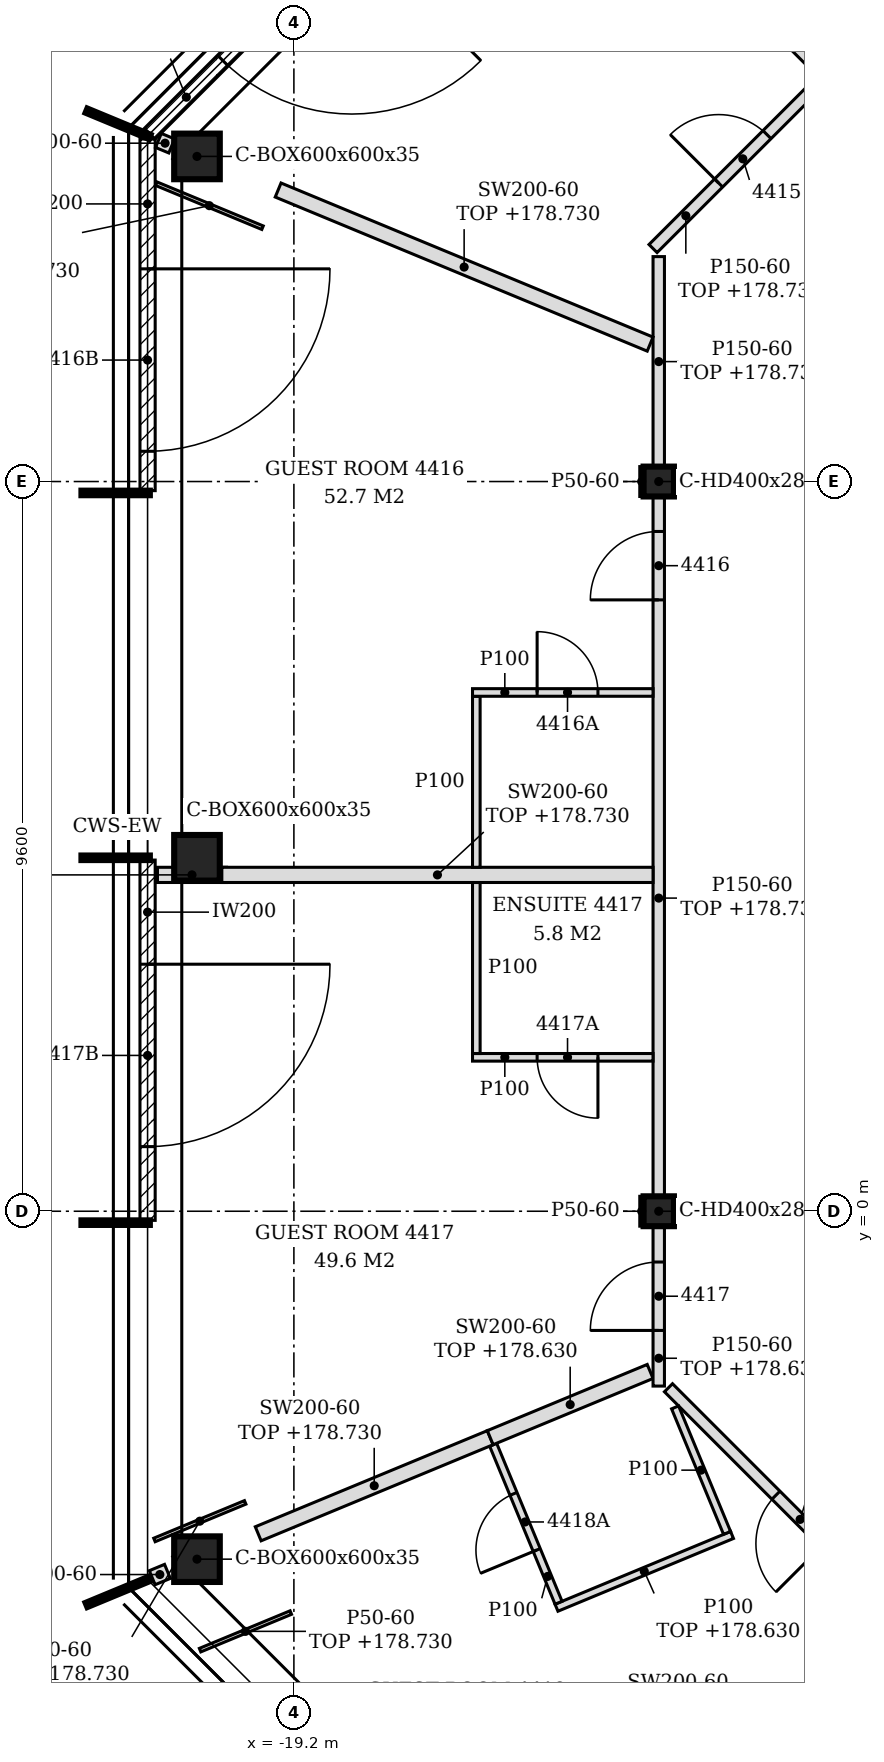
"""IFC4 building model, lengths in metres.
Left out: names, types, materials, properties, quantities, classifications, styles, units other than length and angle.
Written with IfcOpenShell. Run it as: python <this file> out.ifc"""

import sys

from ifc_helpers import new_model, si_unit, direction, frame, frame_2d, origin, origin_2d, place, context, subcontext, project, spatial, polyline, rectangle, hollow_rectangle, i_section, outline, extrude, clip, halfspace, element, fill, save


model = new_model("IFC4")
c1 = context("Model", 3, precision=1e-05, world=origin(), true_north=direction((0.0, 1.0)))
c2 = subcontext(c1, "Body", "Model", "MODEL_VIEW")
j1 = project(units=[si_unit("LENGTHUNIT", "METRE"), si_unit("PLANEANGLEUNIT", "RADIAN")], contexts=[c1])
p1 = place(None, origin())
s1 = spatial("IfcSite", under=j1, at=p1, CompositionType="ELEMENT")
p2 = place(p1, origin())
s2 = spatial("IfcBuilding", under=s1, at=p2, CompositionType="ELEMENT")
p3 = place(p2, frame((0.0, 0.0, 175.8)))
s3 = spatial("IfcBuildingStorey", under=s2, at=p3, CompositionType="ELEMENT", Elevation=175.8)
for number, where, z_axis, x_axis in (
    (1, (-20.475, 13.877, -0.15), (0.183, -0.122, 0.976), (0.555, 0.832, 0.0)),
    (2, (-20.475, 4.65, -0.15), (0.183, -0.122, 0.976), (0.555, 0.832, 0.0)),
    (3, (-20.475, -4.577, -0.15), (0.183, -0.122, 0.976), (0.555, 0.832, 0.0)),
):
    element("IfcColumn", number, at=place(p3, frame(where, z_axis=z_axis, x_axis=x_axis)), inside=s3, PredefinedType="COLUMN", context=c2, shape_type="Clipping", body=[
        clip(clip(extrude(hollow_rectangle(XDim=0.6, YDim=0.6, WallThickness=0.035, at=origin_2d()), origin(), (0.0, 0.0, 1.0), 3.69), halfspace(frame((0.0, 0.0, 0.022), z_axis=(0.0, 0.0, 1.0), x_axis=(1.0, 0.0, 0.0)), True)), halfspace(frame((0.0, 0.0, 3.67), z_axis=(0.0, 0.0, 1.0), x_axis=(1.0, 0.0, 0.0)), False)),
    ])
for number, where, z_axis, x_axis in (
    (4, (-14.4, 0.0, -0.15), (0.0, 0.0, 1.0), (1.0, 0.0, 0.0)),
    (5, (-14.4, 9.6, -0.15), (0.0, 0.0, 1.0), (1.0, 0.0, 0.0)),
):
    element("IfcColumn", number, at=place(p3, frame(where, z_axis=z_axis, x_axis=x_axis)), inside=s3, PredefinedType="COLUMN", context=c2, shape_type="SweptSolid", body=[
        extrude(i_section(OverallWidth=0.399, OverallDepth=0.393, WebThickness=0.023, FlangeThickness=0.037, FilletRadius=0.015, at=origin_2d()), origin(), (0.0, 0.0, 1.0), 3.6),
    ])
p4 = place(p3, frame((-18.295, 16.976, 0.0), z_axis=(0.0, 0.0, 1.0), x_axis=(-0.707137595296, -0.707075965734, 0.0)))
e6 = element("IfcWall", 6, at=p4, inside=s3, PredefinedType="NOTDEFINED", context=c2, shape_type="SweptSolid", body=[
    extrude(rectangle(XDim=3.961, YDim=0.2, at=frame_2d((1.981, 0.0))), origin(), (0.0, 0.0, 1.0), 3.45),
])
p5 = place(p4, frame((0.2, 0.0, 0.0)))
e7 = element("IfcOpeningElement", 7, at=p5, cuts=e6, PredefinedType="OPENING", context=c2, shape_type="SweptSolid", body=[
    extrude(rectangle(XDim=2.4, YDim=2.4, at=frame_2d((1.2, 1.2))), frame((0.0, 0.11, 0.0), z_axis=(0.0, -1.0, 0.0), x_axis=(1.0, 0.0, 0.0)), (0.0, 0.0, 1.0), 0.22),
])
p6 = place(p3, frame((-21.125, 14.106, 0.0), z_axis=(0.0, 0.0, 1.0), x_axis=(0.0, -1.0, 0.0)))
e8 = element("IfcWall", 8, at=p6, inside=s3, PredefinedType="NOTDEFINED", context=c2, shape_type="SweptSolid", body=[
    extrude(rectangle(XDim=4.626, YDim=0.2, at=frame_2d((2.313, 0.0))), origin(), (0.0, 0.0, 1.0), 3.45),
])
p7 = place(p6, frame((1.708, 0.0, 0.0)))
e9 = element("IfcOpeningElement", 9, at=p7, cuts=e8, PredefinedType="OPENING", context=c2, shape_type="SweptSolid", body=[
    extrude(rectangle(XDim=2.4, YDim=2.4, at=frame_2d((1.2, 1.2))), frame((0.0, 0.11, 0.0), z_axis=(0.0, -1.0, 0.0), x_axis=(1.0, 0.0, 0.0)), (0.0, 0.0, 1.0), 0.22),
])
p8 = place(p3, frame((-21.125, 4.62, 0.0), z_axis=(0.0, 0.0, 1.0), x_axis=(0.0, -1.0, 0.0)))
e10 = element("IfcWall", 10, at=p8, inside=s3, PredefinedType="NOTDEFINED", context=c2, shape_type="SweptSolid", body=[
    extrude(rectangle(XDim=4.74, YDim=0.2, at=frame_2d((2.37, 0.0))), origin(), (0.0, 0.0, 1.0), 3.45),
])
p9 = place(p8, frame((1.37, 0.0, 0.0)))
e11 = element("IfcOpeningElement", 11, at=p9, cuts=e10, PredefinedType="OPENING", context=c2, shape_type="SweptSolid", body=[
    extrude(rectangle(XDim=2.4, YDim=2.4, at=frame_2d((1.2, 1.2))), frame((0.0, 0.11, 0.0), z_axis=(0.0, -1.0, 0.0), x_axis=(1.0, 0.0, 0.0)), (0.0, 0.0, 1.0), 0.22),
])
p10 = place(p3, frame((-15.206, -9.119, 0.0), z_axis=(0.0, 0.0, 1.0), x_axis=(0.70719733142, 0.707016219356, 0.0)))
e12 = element("IfcWall", 12, at=p10, inside=s3, PredefinedType="PARTITIONING", context=c2, shape_type="SweptSolid", body=[
    extrude(rectangle(XDim=5.392, YDim=0.2, at=frame_2d((2.696, 0.0))), origin(), (0.0, 0.0, 1.0), 2.83),
])
p11 = place(p3, frame((-8.322, -8.272, 0.0), z_axis=(0.0, 0.0, 1.0), x_axis=(-0.707106781187, 0.707106781187, 0.0)))
e13 = element("IfcWall", 13, at=p11, inside=s3, PredefinedType="PARTITIONING", context=c2, shape_type="SweptSolid", body=[
    extrude(rectangle(XDim=8.415, YDim=0.15, at=frame_2d((4.207, 0.0))), origin(), (0.0, 0.0, 1.0), 2.83),
])
p12 = place(p11, frame((5.515, 0.0, 0.0)))
e14 = element("IfcOpeningElement", 14, at=p12, cuts=e13, PredefinedType="OPENING", context=c2, shape_type="SweptSolid", body=[
    extrude(rectangle(XDim=0.9, YDim=2.1, at=frame_2d((0.45, 1.05))), frame((0.0, 0.085, 0.0), z_axis=(0.0, -1.0, 0.0), x_axis=(1.0, 0.0, 0.0)), (0.0, 0.0, 1.0), 0.17),
])
p13 = place(p11, frame((1.594, 0.0, 0.0)))
e15 = element("IfcOpeningElement", 15, at=p13, cuts=e13, PredefinedType="OPENING", context=c2, shape_type="SweptSolid", body=[
    extrude(rectangle(XDim=0.9, YDim=2.1, at=frame_2d((0.45, 1.05))), frame((0.0, 0.085, 0.0), z_axis=(0.0, -1.0, 0.0), x_axis=(1.0, 0.0, 0.0)), (0.0, 0.0, 1.0), 0.17),
])
p14 = place(p3, frame((-15.745, -5.216, 0.0), z_axis=(0.0, 0.0, 1.0), x_axis=(0.923777505624, 0.38292965425, 0.0)))
e16 = element("IfcWall", 16, at=p14, inside=s3, PredefinedType="PARTITIONING", context=c2, shape_type="SweptSolid", body=[
    extrude(rectangle(XDim=2.5, YDim=0.1, at=frame_2d((1.25, 0.0))), origin(), (0.0, 0.0, 1.0), 2.83),
])
p15 = place(p3, frame((-15.718, -5.151, 0.0), z_axis=(0.0, 0.0, 1.0), x_axis=(-0.382380536126, 0.924004938078, 0.0)))
e17 = element("IfcWall", 17, at=p15, inside=s3, PredefinedType="PARTITIONING", context=c2, shape_type="SweptSolid", body=[
    extrude(rectangle(XDim=2.251, YDim=0.1, at=frame_2d((1.125, 0.0))), origin(), (0.0, 0.0, 1.0), 3.45),
])
p16 = place(p15, frame((0.75, 0.0, 0.0)))
e18 = element("IfcOpeningElement", 18, at=p16, cuts=e17, PredefinedType="OPENING", context=c2, shape_type="SweptSolid", body=[
    extrude(rectangle(XDim=0.8, YDim=2.1, at=frame_2d((0.4, 1.05))), frame((0.0, 0.06, 0.0), z_axis=(0.0, -1.0, 0.0), x_axis=(1.0, 0.0, 0.0)), (0.0, 0.0, 1.0), 0.12),
])
p17 = place(p3, frame((-21.064, -4.821, 0.0), z_axis=(0.0, 0.0, 1.0), x_axis=(0.923674221268, 0.383178721962, 0.0)))
e19 = element("IfcWall", 19, at=p17, inside=s3, PredefinedType="PARTITIONING", context=c2, shape_type="SweptSolid", body=[
    extrude(rectangle(XDim=0.217, YDim=0.2, at=frame_2d((0.109, 0.0))), origin(), (0.0, 0.0, 1.0), 3.45),
])
p18 = place(p3, frame((-19.67, -4.243, 0.0), z_axis=(0.0, 0.0, 1.0), x_axis=(0.923888058455, 0.382662848268, 0.0)))
e20 = element("IfcWall", 20, at=p18, inside=s3, PredefinedType="PARTITIONING", context=c2, shape_type="SweptSolid", body=[
    extrude(rectangle(XDim=3.304, YDim=0.2, at=frame_2d((1.652, 0.0))), origin(), (0.0, 0.0, 1.0), 2.93),
])
p19 = place(p3, frame((-13.501, -4.232, 0.0), z_axis=(0.0, 0.0, 1.0), x_axis=(-0.382528764213, 0.923943582991, 0.0)))
e21 = element("IfcWall", 21, at=p19, inside=s3, PredefinedType="PARTITIONING", context=c2, shape_type="SweptSolid", body=[
    extrude(rectangle(XDim=1.787, YDim=0.1, at=frame_2d((0.894, 0.0))), origin(), (0.0, 0.0, 1.0), 3.45),
])
p20 = place(p3, frame((-16.617, -2.979, 0.0), z_axis=(0.0, 0.0, 1.0), x_axis=(0.923927982336, 0.382566443191, 0.0)))
e22 = element("IfcWall", 22, at=p20, inside=s3, PredefinedType="PARTITIONING", context=c2, shape_type="SweptSolid", body=[
    extrude(rectangle(XDim=2.277, YDim=0.2, at=frame_2d((1.138, 0.0))), origin(), (0.0, 0.0, 1.0), 2.83),
])
p21 = place(p3, frame((-14.4, -2.3, 0.0), z_axis=(0.0, 0.0, 1.0), x_axis=(0.0, 1.0, 0.0)))
e23 = element("IfcWall", 23, at=p21, inside=s3, PredefinedType="PARTITIONING", context=c2, shape_type="SweptSolid", body=[
    extrude(rectangle(XDim=2.104, YDim=0.15, at=frame_2d((1.052, 0.0))), origin(), (0.0, 0.0, 1.0), 2.83),
])
p22 = place(p21, frame((0.732, 0.0, 0.0)))
e24 = element("IfcOpeningElement", 24, at=p22, cuts=e23, PredefinedType="OPENING", context=c2, shape_type="SweptSolid", body=[
    extrude(rectangle(XDim=0.9, YDim=2.1, at=frame_2d((0.45, 1.05))), frame((0.0, 0.085, 0.0), z_axis=(0.0, -1.0, 0.0), x_axis=(1.0, 0.0, 0.0)), (0.0, 0.0, 1.0), 0.17),
])
p23 = place(p3, frame((-14.4, 0.197, 0.0), z_axis=(0.0, 0.0, 1.0), x_axis=(0.0, 1.0, 0.0)))
e25 = element("IfcWall", 25, at=p23, inside=s3, PredefinedType="PARTITIONING", context=c2, shape_type="SweptSolid", body=[
    extrude(rectangle(XDim=9.207, YDim=0.15, at=frame_2d((4.604, 0.0))), origin(), (0.0, 0.0, 1.0), 2.93),
])
p24 = place(p23, frame((7.846, 0.0, 0.0)))
e26 = element("IfcOpeningElement", 26, at=p24, cuts=e25, PredefinedType="OPENING", context=c2, shape_type="SweptSolid", body=[
    extrude(rectangle(XDim=0.9, YDim=2.1, at=frame_2d((0.45, 1.05))), frame((0.0, 0.085, 0.0), z_axis=(0.0, -1.0, 0.0), x_axis=(1.0, 0.0, 0.0)), (0.0, 0.0, 1.0), 0.17),
])
p25 = place(p3, frame((-16.85, 2.025, 0.0), z_axis=(0.0, 0.0, 1.0), x_axis=(1.0, 0.0, 0.0)))
e27 = element("IfcWall", 27, at=p25, inside=s3, PredefinedType="PARTITIONING", context=c2, shape_type="SweptSolid", body=[
    extrude(outline(polyline([(0.0, 0.0), (2.375, 0.0), (2.375, 2.93), (2.3, 2.93), (2.298, 3.45), (0.0, 3.45), (0.0, 0.0)])), frame((0.0, 0.05, 0.0), z_axis=(0.0, -1.0, 0.0), x_axis=(1.0, 0.0, 0.0)), (0.0, 0.0, 1.0), 0.1),
])
p26 = place(p25, frame((0.85, 0.0, 0.0)))
e28 = element("IfcOpeningElement", 28, at=p26, cuts=e27, PredefinedType="OPENING", context=c2, shape_type="SweptSolid", body=[
    extrude(rectangle(XDim=0.8, YDim=2.1, at=frame_2d((0.4, 1.05))), frame((0.0, 0.06, 0.0), z_axis=(0.0, -1.0, 0.0), x_axis=(1.0, 0.0, 0.0)), (0.0, 0.0, 1.0), 0.12),
])
p27 = place(p3, frame((-16.8, 2.075, 0.0), z_axis=(0.0, 0.0, 1.0), x_axis=(0.0, 1.0, 0.0)))
e29 = element("IfcWall", 29, at=p27, inside=s3, PredefinedType="PARTITIONING", context=c2, shape_type="SweptSolid", body=[
    extrude(outline(polyline([(0.0, 0.0), (2.25, 0.0), (2.25, 3.45), (2.21, 3.45), (2.208, 3.07), (2.04, 3.07), (2.038, 3.45), (0.0, 3.45), (0.0, 0.0)])), frame((0.0, 0.05, 0.0), z_axis=(0.0, -1.0, 0.0), x_axis=(1.0, 0.0, 0.0)), (0.0, 0.0, 1.0), 0.1),
])
p28 = place(p3, frame((-20.995, 4.425, 0.0), z_axis=(0.0, 0.0, 1.0), x_axis=(1.0, 0.0, 0.0)))
e30 = element("IfcWall", 30, at=p28, inside=s3, PredefinedType="PARTITIONING", context=c2, shape_type="SweptSolid", body=[
    extrude(outline(polyline([(0.0, 0.0), (0.167, 0.0), (0.288, 0.863), (0.449, 1.725), (0.675, 2.587), (0.909, 3.45), (0.0, 3.45), (0.0, 2.587), (0.0, 1.725), (0.0, 0.863), (0.0, 0.0)])), frame((0.0, 0.1, 0.0), z_axis=(0.0, -1.0, 0.0), x_axis=(1.0, 0.0, 0.0)), (0.0, 0.0, 1.0), 0.2),
])
p29 = place(p3, frame((-20.148, 4.425, 0.0), z_axis=(0.0, 0.0, 1.0), x_axis=(1.0, 0.0, 0.0)))
e31 = element("IfcWall", 31, at=p29, inside=s3, PredefinedType="PARTITIONING", context=c2, shape_type="SweptSolid", body=[
    extrude(outline(polyline([(0.0, 0.0), (5.673, 0.0), (5.673, 0.863), (5.673, 1.725), (5.673, 2.587), (5.673, 2.93), (0.646, 2.93), (0.609, 2.587), (0.447, 1.725), (0.234, 0.863), (0.0, 0.0)])), frame((0.0, 0.1, 0.0), z_axis=(0.0, -1.0, 0.0), x_axis=(1.0, 0.0, 0.0)), (0.0, 0.0, 1.0), 0.2),
])
p30 = place(p3, frame((-16.8, 4.525, 0.0), z_axis=(0.0, 0.0, 1.0), x_axis=(0.0, 1.0, 0.0)))
e32 = element("IfcWall", 32, at=p30, inside=s3, PredefinedType="PARTITIONING", context=c2, shape_type="SweptSolid", body=[
    extrude(rectangle(XDim=2.25, YDim=0.1, at=frame_2d((1.125, 0.0))), origin(), (0.0, 0.0, 1.0), 3.45),
])
p31 = place(p3, frame((-16.85, 6.825, 0.0), z_axis=(0.0, 0.0, 1.0), x_axis=(1.0, 0.0, 0.0)))
e33 = element("IfcWall", 33, at=p31, inside=s3, PredefinedType="PARTITIONING", context=c2, shape_type="SweptSolid", body=[
    extrude(outline(polyline([(0.0, 0.0), (2.375, 0.0), (2.375, 2.93), (2.3, 2.93), (2.298, 3.45), (0.0, 3.45), (0.0, 0.0)])), frame((0.0, 0.05, 0.0), z_axis=(0.0, -1.0, 0.0), x_axis=(1.0, 0.0, 0.0)), (0.0, 0.0, 1.0), 0.1),
])
p32 = place(p31, frame((0.85, 0.0, 0.0)))
e34 = element("IfcOpeningElement", 34, at=p32, cuts=e33, PredefinedType="OPENING", context=c2, shape_type="SweptSolid", body=[
    extrude(rectangle(XDim=0.8, YDim=2.1, at=frame_2d((0.4, 1.05))), frame((0.0, 0.06, 0.0), z_axis=(0.0, -1.0, 0.0), x_axis=(1.0, 0.0, 0.0)), (0.0, 0.0, 1.0), 0.12),
])
p33 = place(p3, frame((-14.4, 9.796, 0.0), z_axis=(0.0, 0.0, 1.0), x_axis=(0.0, 1.0, 0.0)))
e35 = element("IfcWall", 35, at=p33, inside=s3, PredefinedType="PARTITIONING", context=c2, shape_type="SweptSolid", body=[
    extrude(rectangle(XDim=2.763, YDim=0.15, at=frame_2d((1.381, 0.0))), origin(), (0.0, 0.0, 1.0), 2.93),
])
p34 = place(p3, frame((-14.513, 11.408, 0.0), z_axis=(0.0, 0.0, 1.0), x_axis=(-0.923884829347, 0.382670644421, 0.0)))
e36 = element("IfcWall", 36, at=p34, inside=s3, PredefinedType="PARTITIONING", context=c2, shape_type="SweptSolid", body=[
    extrude(rectangle(XDim=5.297, YDim=0.2, at=frame_2d((2.649, 0.0))), origin(), (0.0, 0.0, 1.0), 2.93),
])
p35 = place(p3, frame((-14.475, 12.665, 0.0), z_axis=(0.0, 0.0, 1.0), x_axis=(0.70726258305, 0.706950944987, 0.0)))
e37 = element("IfcWall", 37, at=p35, inside=s3, PredefinedType="PARTITIONING", context=c2, shape_type="SweptSolid", body=[
    extrude(rectangle(XDim=3.134, YDim=0.15, at=frame_2d((1.567, 0.0))), origin(), (0.0, 0.0, 1.0), 2.93),
])
p36 = place(p35, frame((1.22, 0.0, 0.0)))
e38 = element("IfcOpeningElement", 38, at=p36, cuts=e37, PredefinedType="OPENING", context=c2, shape_type="SweptSolid", body=[
    extrude(rectangle(XDim=0.9, YDim=2.1, at=frame_2d((0.45, 1.05))), frame((0.0, 0.085, 0.0), z_axis=(0.0, -1.0, 0.0), x_axis=(1.0, 0.0, 0.0)), (0.0, 0.0, 1.0), 0.17),
])
p37 = place(p3, frame((-20.808, 14.015, 0.0), z_axis=(0.0, 0.0, 1.0), x_axis=(-0.92368644112, 0.383149263984, 0.0)))
e39 = element("IfcWall", 39, at=p37, inside=s3, PredefinedType="PARTITIONING", context=c2, shape_type="SweptSolid", body=[
    extrude(rectangle(XDim=0.189, YDim=0.2, at=frame_2d((0.095, 0.0))), origin(), (0.0, 0.0, 1.0), 3.45),
])
p38 = place(p3, frame((-12.135, 14.898, 0.0), z_axis=(0.0, 0.0, 1.0), x_axis=(-0.707106781187, 0.707106781187, 0.0)))
e40 = element("IfcWall", 40, at=p38, inside=s3, PredefinedType="PARTITIONING", context=c2, shape_type="SweptSolid", body=[
    extrude(rectangle(XDim=4.02, YDim=0.2, at=frame_2d((2.01, 0.0))), origin(), (0.0, 0.0, 1.0), 2.93),
])
p39 = place(p3, frame((-20.434, -5.774, 0.0), z_axis=(0.0, 0.0, 1.0), x_axis=(0.92388555257, 0.382668898334, 0.0)))
e41 = element("IfcWall", 41, at=p39, inside=s3, PredefinedType="PARTITIONING", context=c2, shape_type="SweptSolid", body=[
    extrude(rectangle(XDim=1.292, YDim=0.05, at=frame_2d((0.646, 0.0))), origin(), (0.0, 0.0, 1.0), 2.93),
])
p40 = place(p3, frame((-21.035, -4.325, 0.0), z_axis=(0.0, 0.0, 1.0), x_axis=(0.923846419958, 0.382763363361, 0.0)))
e42 = element("IfcWall", 42, at=p40, inside=s3, PredefinedType="PARTITIONING", context=c2, shape_type="SweptSolid", body=[
    extrude(rectangle(XDim=1.292, YDim=0.05, at=frame_2d((0.646, 0.0))), origin(), (0.0, 0.0, 1.0), 2.93),
])
p41 = place(p3, frame((-14.625, -0.197, 0.0), z_axis=(0.0, 0.0, 1.0), x_axis=(0.0, 1.0, 0.0)))
e43 = element("IfcWall", 43, at=p41, inside=s3, PredefinedType="PARTITIONING", context=c2, shape_type="SweptSolid", body=[
    extrude(rectangle(XDim=0.393, YDim=0.05, at=frame_2d((0.197, 0.0))), origin(), (0.0, 0.0, 1.0), 3.45),
])
p42 = place(p3, frame((-14.625, 9.404, 0.0), z_axis=(0.0, 0.0, 1.0), x_axis=(0.0, 1.0, 0.0)))
e44 = element("IfcWall", 44, at=p42, inside=s3, PredefinedType="PARTITIONING", context=c2, shape_type="SweptSolid", body=[
    extrude(rectangle(XDim=0.393, YDim=0.05, at=frame_2d((0.196, 0.0))), origin(), (0.0, 0.0, 1.0), 3.45),
])
p43 = place(p3, frame((-19.613, 12.939, 0.0), z_axis=(0.0, 0.0, 1.0), x_axis=(-0.923851894913, 0.382750148616, 0.0)))
e45 = element("IfcWall", 45, at=p43, inside=s3, PredefinedType="PARTITIONING", context=c2, shape_type="SweptSolid", body=[
    extrude(rectangle(XDim=1.516, YDim=0.05, at=frame_2d((0.758, 0.0))), origin(), (0.0, 0.0, 1.0), 2.93),
])
p44 = place(p5, origin())
e46 = element("IfcDoor", 46, at=p44, inside=s3, OperationType="SINGLE_SWING_LEFT", PredefinedType="DOOR", context=c2, shape_type="SweptSolid", body=[
    extrude(rectangle(XDim=2.4, YDim=2.4, at=frame_2d((1.2, 1.2))), frame((0.0, 0.025, 0.0), z_axis=(0.0, -1.0, 0.0), x_axis=(1.0, 0.0, 0.0)), (0.0, 0.0, 1.0), 0.05),
])
fill(e7, e46)
p45 = place(p7, origin())
e47 = element("IfcDoor", 47, at=p45, inside=s3, OperationType="SINGLE_SWING_LEFT", PredefinedType="DOOR", context=c2, shape_type="SweptSolid", body=[
    extrude(rectangle(XDim=2.4, YDim=2.4, at=frame_2d((1.2, 1.2))), frame((0.0, 0.025, 0.0), z_axis=(0.0, -1.0, 0.0), x_axis=(1.0, 0.0, 0.0)), (0.0, 0.0, 1.0), 0.05),
])
fill(e9, e47)
p46 = place(p9, origin())
e48 = element("IfcDoor", 48, at=p46, inside=s3, OperationType="SINGLE_SWING_LEFT", PredefinedType="DOOR", context=c2, shape_type="SweptSolid", body=[
    extrude(rectangle(XDim=2.4, YDim=2.4, at=frame_2d((1.2, 1.2))), frame((0.0, 0.025, 0.0), z_axis=(0.0, -1.0, 0.0), x_axis=(1.0, 0.0, 0.0)), (0.0, 0.0, 1.0), 0.05),
])
fill(e11, e48)
p47 = place(p36, origin())
e49 = element("IfcDoor", 49, at=p47, inside=s3, OperationType="SINGLE_SWING_LEFT", PredefinedType="DOOR", context=c2, shape_type="SweptSolid", body=[
    extrude(rectangle(XDim=0.9, YDim=2.1, at=frame_2d((0.45, 1.05))), frame((0.0, 0.025, 0.0), z_axis=(0.0, -1.0, 0.0), x_axis=(1.0, 0.0, 0.0)), (0.0, 0.0, 1.0), 0.05),
])
fill(e38, e49)
p48 = place(p24, origin())
e50 = element("IfcDoor", 50, at=p48, inside=s3, OperationType="SINGLE_SWING_LEFT", PredefinedType="DOOR", context=c2, shape_type="SweptSolid", body=[
    extrude(rectangle(XDim=0.9, YDim=2.1, at=frame_2d((0.45, 1.05))), frame((0.0, 0.025, 0.0), z_axis=(0.0, -1.0, 0.0), x_axis=(1.0, 0.0, 0.0)), (0.0, 0.0, 1.0), 0.05),
])
fill(e26, e50)
p49 = place(p32, origin())
e51 = element("IfcDoor", 51, at=p49, inside=s3, OperationType="SINGLE_SWING_LEFT", PredefinedType="DOOR", context=c2, shape_type="SweptSolid", body=[
    extrude(rectangle(XDim=0.8, YDim=2.1, at=frame_2d((0.4, 1.05))), frame((0.0, 0.025, 0.0), z_axis=(0.0, -1.0, 0.0), x_axis=(1.0, 0.0, 0.0)), (0.0, 0.0, 1.0), 0.05),
])
fill(e34, e51)
p50 = place(p22, origin())
e52 = element("IfcDoor", 52, at=p50, inside=s3, OperationType="SINGLE_SWING_LEFT", PredefinedType="DOOR", context=c2, shape_type="SweptSolid", body=[
    extrude(rectangle(XDim=0.9, YDim=2.1, at=frame_2d((0.45, 1.05))), frame((0.0, 0.025, 0.0), z_axis=(0.0, -1.0, 0.0), x_axis=(1.0, 0.0, 0.0)), (0.0, 0.0, 1.0), 0.05),
])
fill(e24, e52)
p51 = place(p26, frame((0.8, 0.0, 0.0), z_axis=(0.0, 0.0, 1.0), x_axis=(-1.0, 0.0, 0.0)))
e53 = element("IfcDoor", 53, at=p51, inside=s3, OperationType="SINGLE_SWING_LEFT", PredefinedType="DOOR", context=c2, shape_type="SweptSolid", body=[
    extrude(rectangle(XDim=0.8, YDim=2.1, at=frame_2d((0.4, 1.05))), frame((0.0, 0.025, 0.0), z_axis=(0.0, -1.0, 0.0), x_axis=(1.0, 0.0, 0.0)), (0.0, 0.0, 1.0), 0.05),
])
fill(e28, e53)
p52 = place(p12, origin())
e54 = element("IfcDoor", 54, at=p52, inside=s3, OperationType="SINGLE_SWING_LEFT", PredefinedType="DOOR", context=c2, shape_type="SweptSolid", body=[
    extrude(rectangle(XDim=0.9, YDim=2.1, at=frame_2d((0.45, 1.05))), frame((0.0, 0.025, 0.0), z_axis=(0.0, -1.0, 0.0), x_axis=(1.0, 0.0, 0.0)), (0.0, 0.0, 1.0), 0.05),
])
fill(e14, e54)
p53 = place(p16, origin())
e55 = element("IfcDoor", 55, at=p53, inside=s3, OperationType="SINGLE_SWING_LEFT", PredefinedType="DOOR", context=c2, shape_type="SweptSolid", body=[
    extrude(rectangle(XDim=0.8, YDim=2.1, at=frame_2d((0.4, 1.05))), frame((0.0, 0.025, 0.0), z_axis=(0.0, -1.0, 0.0), x_axis=(1.0, 0.0, 0.0)), (0.0, 0.0, 1.0), 0.05),
])
fill(e18, e55)
save(model, sys.argv[1])
